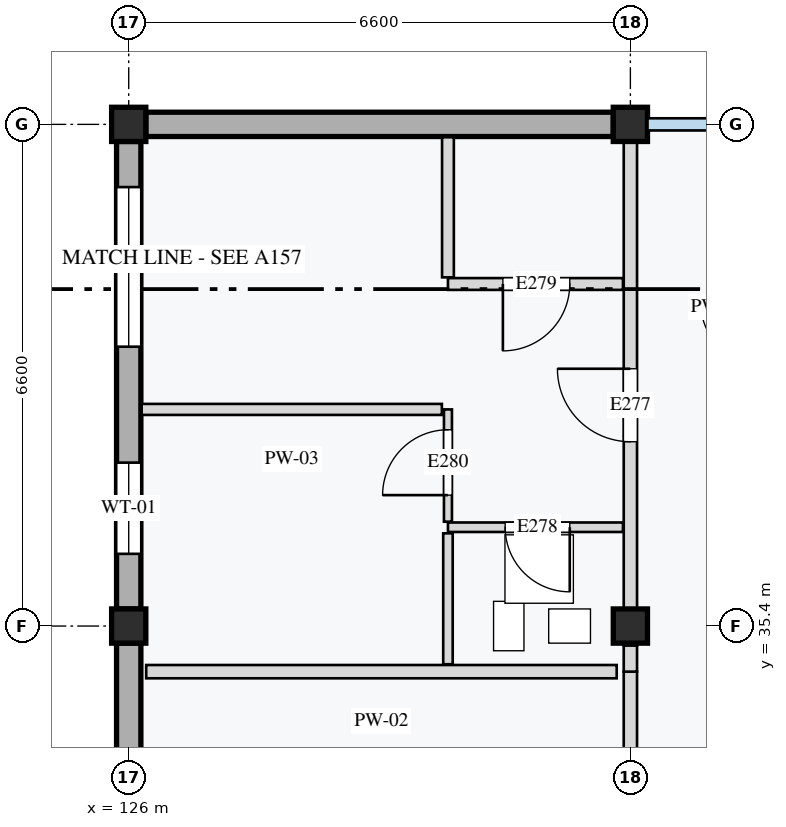
"""IFC4 building model, lengths in metres.
Left out: names, types, materials, properties, quantities, classifications, styles, units other than length and angle.
Written with IfcOpenShell. Run it as: python <this file> out.ifc"""

import sys

from ifc_helpers import new_model, si_unit, direction, frame, frame_2d, origin, origin_2d, place, context, subcontext, project, spatial, rectangle, extrude, element, fill, save


model = new_model("IFC4")
c1 = context("Model", 3, precision=1e-05, world=origin(), true_north=direction((0.0, 1.0)))
c2 = subcontext(c1, "Body", "Model", "MODEL_VIEW")
j1 = project(units=[si_unit("LENGTHUNIT", "METRE"), si_unit("PLANEANGLEUNIT", "RADIAN")], contexts=[c1])
p1 = place(None, origin())
s1 = spatial("IfcSite", under=j1, at=p1, CompositionType="ELEMENT")
p2 = place(p1, origin())
s2 = spatial("IfcBuilding", under=s1, at=p2, CompositionType="ELEMENT")
p3 = place(p2, frame((0.0, 0.0, 21.2)))
s3 = spatial("IfcBuildingStorey", under=s2, at=p3, CompositionType="ELEMENT", Elevation=21.2)
for number, where, z_axis, x_axis in (
    (1, (126.0, 35.4, 0.0), (0.0, 0.0, 1.0), (1.0, 0.0, 0.0)),
    (2, (132.6, 35.4, 0.0), (0.0, 0.0, 1.0), (1.0, 0.0, 0.0)),
    (3, (126.0, 42.0, 0.0), (0.0, 0.0, 1.0), (1.0, 0.0, 0.0)),
    (4, (132.6, 42.0, 0.0), (0.0, 0.0, 1.0), (1.0, 0.0, 0.0)),
):
    element("IfcColumn", number, at=place(p3, frame(where, z_axis=z_axis, x_axis=x_axis)), inside=s3, PredefinedType="COLUMN", context=c2, shape_type="SweptSolid", body=[
        extrude(rectangle(XDim=0.45, YDim=0.45, at=origin_2d()), origin(), (0.0, 0.0, 1.0), 3.2),
    ])
p4 = place(p3, frame((126.0, 29.025, 0.0), z_axis=(0.0, 0.0, 1.0), x_axis=(0.0, 1.0, 0.0)))
e5 = element("IfcWall", 5, at=p4, inside=s3, PredefinedType="STANDARD", context=c2, shape_type="SweptSolid", body=[
    extrude(rectangle(XDim=6.15, YDim=0.32, at=frame_2d((3.075, 0.0))), origin(), (0.0, 0.0, 1.0), 2.6),
])
p5 = place(p4, frame((1.875, 0.0, 0.85)))
e6 = element("IfcOpeningElement", 6, at=p5, cuts=e5, PredefinedType="OPENING", context=c2, shape_type="SweptSolid", body=[
    extrude(rectangle(XDim=1.8, YDim=1.35, at=frame_2d((0.9, 0.675))), frame((0.0, 0.17, 0.0), z_axis=(0.0, -1.0, 0.0), x_axis=(1.0, 0.0, 0.0)), (0.0, 0.0, 1.0), 0.34),
])
p6 = place(p3, frame((126.0, 35.625, 0.0), z_axis=(0.0, 0.0, 1.0), x_axis=(0.0, 1.0, 0.0)))
e7 = element("IfcWall", 7, at=p6, inside=s3, PredefinedType="STANDARD", context=c2, shape_type="SweptSolid", body=[
    extrude(rectangle(XDim=6.15, YDim=0.32, at=frame_2d((3.075, 0.0))), origin(), (0.0, 0.0, 1.0), 2.6),
])
p7 = place(p6, frame((0.725, 0.0, 0.85)))
e8 = element("IfcOpeningElement", 8, at=p7, cuts=e7, PredefinedType="OPENING", context=c2, shape_type="SweptSolid", body=[
    extrude(rectangle(XDim=1.2, YDim=1.35, at=frame_2d((0.6, 0.675))), frame((0.0, 0.17, 0.0), z_axis=(0.0, -1.0, 0.0), x_axis=(1.0, 0.0, 0.0)), (0.0, 0.0, 1.0), 0.34),
])
p8 = place(p6, frame((3.45, 0.0, 0.85)))
e9 = element("IfcOpeningElement", 9, at=p8, cuts=e7, PredefinedType="OPENING", context=c2, shape_type="SweptSolid", body=[
    extrude(rectangle(XDim=2.1, YDim=1.55, at=frame_2d((1.05, 0.775))), frame((0.0, 0.17, 0.0), z_axis=(0.0, -1.0, 0.0), x_axis=(1.0, 0.0, 0.0)), (0.0, 0.0, 1.0), 0.34),
])
p9 = place(p3, frame((126.225, 42.0, 0.0), z_axis=(0.0, 0.0, 1.0), x_axis=(1.0, 0.0, 0.0)))
e10 = element("IfcWall", 10, at=p9, inside=s3, PredefinedType="STANDARD", context=c2, shape_type="SweptSolid", body=[
    extrude(rectangle(XDim=6.15, YDim=0.32, at=frame_2d((3.075, 0.0))), origin(), (0.0, 0.0, 1.0), 2.65),
])
p10 = place(p3, frame((132.6, 28.8, 0.0), z_axis=(0.0, 0.0, 1.0), x_axis=(0.0, 1.0, 0.0)))
e11 = element("IfcWall", 11, at=p10, inside=s3, PredefinedType="PARTITIONING", context=c2, shape_type="SweptSolid", body=[
    extrude(rectangle(XDim=6.0, YDim=0.175, at=frame_2d((3.0, 0.0))), origin(), (0.0, 0.0, 1.0), 2.55),
])
p11 = place(p10, frame((2.6, 0.0, 0.0)))
e12 = element("IfcOpeningElement", 12, at=p11, cuts=e11, PredefinedType="OPENING", context=c2, shape_type="SweptSolid", body=[
    extrude(rectangle(XDim=0.95, YDim=2.16, at=frame_2d((0.475, 1.08))), frame((0.0, 0.097, 0.0), z_axis=(0.0, -1.0, 0.0), x_axis=(1.0, 0.0, 0.0)), (0.0, 0.0, 1.0), 0.195),
])
p12 = place(p3, frame((132.42, 34.8, 0.0), z_axis=(0.0, 0.0, 1.0), x_axis=(-1.0, 0.0, 0.0)))
e13 = element("IfcWall", 13, at=p12, inside=s3, PredefinedType="PARTITIONING", context=c2, shape_type="SweptSolid", body=[
    extrude(rectangle(XDim=6.19, YDim=0.175, at=frame_2d((3.095, 0.0))), origin(), (0.0, 0.0, 1.0), 2.96),
])
p13 = place(p3, frame((132.6, 34.8, 0.0), z_axis=(0.0, 0.0, 1.0), x_axis=(0.0, 1.0, 0.0)))
e14 = element("IfcWall", 14, at=p13, inside=s3, PredefinedType="PARTITIONING", context=c2, shape_type="SweptSolid", body=[
    extrude(rectangle(XDim=0.345, YDim=0.175, at=frame_2d((0.172, 0.0))), origin(), (0.0, 0.0, 1.0), 2.96),
])
p14 = place(p3, frame((132.6, 35.145, 0.0), z_axis=(0.0, 0.0, 1.0), x_axis=(0.0, 1.0, 0.0)))
e15 = element("IfcWall", 15, at=p14, inside=s3, PredefinedType="PARTITIONING", context=c2, shape_type="SweptSolid", body=[
    extrude(rectangle(XDim=6.855, YDim=0.175, at=frame_2d((3.427, 0.0))), origin(), (0.0, 0.0, 1.0), 2.55),
])
p15 = place(p14, frame((2.68, 0.0, 0.0)))
e16 = element("IfcOpeningElement", 16, at=p15, cuts=e15, PredefinedType="OPENING", context=c2, shape_type="SweptSolid", body=[
    extrude(rectangle(XDim=0.96, YDim=2.18, at=frame_2d((0.48, 1.09))), frame((0.0, 0.097, 0.0), z_axis=(0.0, -1.0, 0.0), x_axis=(1.0, 0.0, 0.0)), (0.0, 0.0, 1.0), 0.195),
])
p16 = place(p3, frame((132.502, 36.7, 0.0), z_axis=(0.0, 0.0, 1.0), x_axis=(-1.0, 0.0, 0.0)))
e17 = element("IfcWall", 17, at=p16, inside=s3, PredefinedType="PARTITIONING", context=c2, shape_type="SweptSolid", body=[
    extrude(rectangle(XDim=2.302, YDim=0.125, at=frame_2d((1.151, 0.0))), origin(), (0.0, 0.0, 1.0), 2.96),
])
p17 = place(p16, frame((0.7, 0.0, 0.0)))
e18 = element("IfcOpeningElement", 18, at=p17, cuts=e17, PredefinedType="OPENING", context=c2, shape_type="SweptSolid", body=[
    extrude(rectangle(XDim=0.85, YDim=2.04, at=frame_2d((0.425, 1.02))), frame((0.0, 0.073, 0.0), z_axis=(0.0, -1.0, 0.0), x_axis=(1.0, 0.0, 0.0)), (0.0, 0.0, 1.0), 0.145),
])
p18 = place(p3, frame((130.2, 34.897, 0.0), z_axis=(0.0, 0.0, 1.0), x_axis=(0.0, 1.0, 0.0)))
e19 = element("IfcWall", 19, at=p18, inside=s3, PredefinedType="PARTITIONING", context=c2, shape_type="SweptSolid", body=[
    extrude(rectangle(XDim=1.723, YDim=0.125, at=frame_2d((0.861, 0.0))), origin(), (0.0, 0.0, 1.0), 2.96),
])
p19 = place(p3, frame((132.502, 39.9, 0.0), z_axis=(0.0, 0.0, 1.0), x_axis=(-1.0, 0.0, 0.0)))
e20 = element("IfcWall", 20, at=p19, inside=s3, PredefinedType="PARTITIONING", context=c2, shape_type="SweptSolid", body=[
    extrude(rectangle(XDim=2.302, YDim=0.155, at=frame_2d((1.151, 0.0))), origin(), (0.0, 0.0, 1.0), 2.96),
])
p20 = place(p19, frame((0.7, 0.0, 0.0)))
e21 = element("IfcOpeningElement", 21, at=p20, cuts=e20, PredefinedType="OPENING", context=c2, shape_type="SweptSolid", body=[
    extrude(rectangle(XDim=0.88, YDim=2.16, at=frame_2d((0.44, 1.08))), frame((0.0, 0.087, 0.0), z_axis=(0.0, -1.0, 0.0), x_axis=(1.0, 0.0, 0.0)), (0.0, 0.0, 1.0), 0.175),
])
p21 = place(p3, frame((130.2, 39.988, 0.0), z_axis=(0.0, 0.0, 1.0), x_axis=(0.0, 1.0, 0.0)))
e22 = element("IfcWall", 22, at=p21, inside=s3, PredefinedType="PARTITIONING", context=c2, shape_type="SweptSolid", body=[
    extrude(rectangle(XDim=1.843, YDim=0.155, at=frame_2d((0.921, 0.0))), origin(), (0.0, 0.0, 1.0), 2.96),
])
p22 = place(p3, frame((130.2, 36.772, 0.0), z_axis=(0.0, 0.0, 1.0), x_axis=(0.0, 1.0, 0.0)))
e23 = element("IfcWall", 23, at=p22, inside=s3, PredefinedType="PARTITIONING", context=c2, shape_type="SweptSolid", body=[
    extrude(rectangle(XDim=1.478, YDim=0.105, at=frame_2d((0.739, 0.0))), origin(), (0.0, 0.0, 1.0), 2.96),
])
p23 = place(p22, frame((0.35, 0.0, 0.0)))
e24 = element("IfcOpeningElement", 24, at=p23, cuts=e23, PredefinedType="OPENING", context=c2, shape_type="SweptSolid", body=[
    extrude(rectangle(XDim=0.86, YDim=2.12, at=frame_2d((0.43, 1.06))), frame((0.0, 0.062, 0.0), z_axis=(0.0, -1.0, 0.0), x_axis=(1.0, 0.0, 0.0)), (0.0, 0.0, 1.0), 0.125),
])
p24 = place(p3, frame((130.12, 38.25, 0.0), z_axis=(0.0, 0.0, 1.0), x_axis=(-1.0, 0.0, 0.0)))
e25 = element("IfcWall", 25, at=p24, inside=s3, PredefinedType="PARTITIONING", context=c2, shape_type="SweptSolid", body=[
    extrude(rectangle(XDim=3.95, YDim=0.145, at=frame_2d((1.975, 0.0))), origin(), (0.0, 0.0, 1.0), 2.96),
])
p25 = place(p7, origin())
e26 = element("IfcWindow", 26, at=p25, inside=s3, PartitioningType="SINGLE_PANEL", PredefinedType="WINDOW", context=c2, shape_type="SweptSolid", body=[
    extrude(rectangle(XDim=1.2, YDim=1.35, at=frame_2d((0.6, 0.675))), frame((0.0, 0.03, 0.0), z_axis=(0.0, -1.0, 0.0), x_axis=(1.0, 0.0, 0.0)), (0.0, 0.0, 1.0), 0.06),
])
fill(e8, e26)
p26 = place(p8, origin())
e27 = element("IfcWindow", 27, at=p26, inside=s3, PartitioningType="SINGLE_PANEL", PredefinedType="WINDOW", context=c2, shape_type="SweptSolid", body=[
    extrude(rectangle(XDim=2.1, YDim=1.55, at=frame_2d((1.05, 0.775))), frame((0.0, 0.03, 0.0), z_axis=(0.0, -1.0, 0.0), x_axis=(1.0, 0.0, 0.0)), (0.0, 0.0, 1.0), 0.06),
])
fill(e9, e27)
p27 = place(p15, origin())
e28 = element("IfcDoor", 28, at=p27, inside=s3, OperationType="SINGLE_SWING_RIGHT", PredefinedType="DOOR", context=c2, shape_type="SweptSolid", body=[
    extrude(rectangle(XDim=0.96, YDim=2.18, at=frame_2d((0.48, 1.09))), frame((0.0, 0.025, 0.0), z_axis=(0.0, -1.0, 0.0), x_axis=(1.0, 0.0, 0.0)), (0.0, 0.0, 1.0), 0.05),
])
fill(e16, e28)
p28 = place(p17, origin())
e29 = element("IfcDoor", 29, at=p28, inside=s3, OperationType="SINGLE_SWING_LEFT", PredefinedType="DOOR", context=c2, shape_type="SweptSolid", body=[
    extrude(rectangle(XDim=0.85, YDim=2.04, at=frame_2d((0.425, 1.02))), frame((0.0, 0.025, 0.0), z_axis=(0.0, -1.0, 0.0), x_axis=(1.0, 0.0, 0.0)), (0.0, 0.0, 1.0), 0.05),
])
fill(e18, e29)
p29 = place(p20, origin())
e30 = element("IfcDoor", 30, at=p29, inside=s3, OperationType="SINGLE_SWING_RIGHT", PredefinedType="DOOR", context=c2, shape_type="SweptSolid", body=[
    extrude(rectangle(XDim=0.88, YDim=2.16, at=frame_2d((0.44, 1.08))), frame((0.0, 0.025, 0.0), z_axis=(0.0, -1.0, 0.0), x_axis=(1.0, 0.0, 0.0)), (0.0, 0.0, 1.0), 0.05),
])
fill(e21, e30)
p30 = place(p23, origin())
e31 = element("IfcDoor", 31, at=p30, inside=s3, OperationType="SINGLE_SWING_LEFT", PredefinedType="DOOR", context=c2, shape_type="SweptSolid", body=[
    extrude(rectangle(XDim=0.86, YDim=2.12, at=frame_2d((0.43, 1.06))), frame((0.0, 0.025, 0.0), z_axis=(0.0, -1.0, 0.0), x_axis=(1.0, 0.0, 0.0)), (0.0, 0.0, 1.0), 0.05),
])
fill(e24, e31)
save(model, sys.argv[1])
